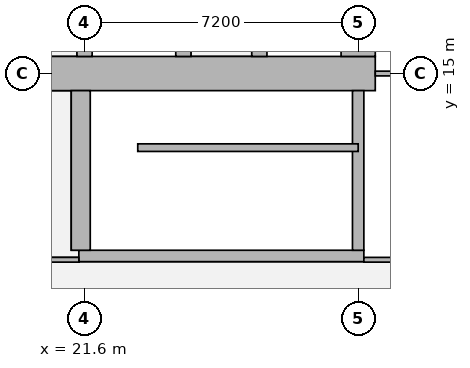
"""IFC4 building model, lengths in metres.
Left out: names, types, materials, properties, quantities, classifications, styles, units other than length and angle.
Written with IfcOpenShell. Run it as: python <this file> out.ifc"""

import sys

from ifc_helpers import new_model, si_unit, direction, frame, frame_2d, origin, place, context, subcontext, project, spatial, rectangle, extrude, element, fill, save


model = new_model("IFC4")
c1 = context("Model", 3, precision=1e-05, world=origin(), true_north=direction((0.0, 1.0)))
c2 = subcontext(c1, "Body", "Model", "MODEL_VIEW")
j1 = project(units=[si_unit("LENGTHUNIT", "METRE"), si_unit("PLANEANGLEUNIT", "RADIAN")], contexts=[c1])
p1 = place(None, origin())
s1 = spatial("IfcSite", under=j1, at=p1, CompositionType="ELEMENT")
p2 = place(p1, origin())
s2 = spatial("IfcBuilding", under=s1, at=p2, CompositionType="ELEMENT")
p3 = place(p2, frame((0.0, 0.0, 81.65)))
s3 = spatial("IfcBuildingStorey", under=s2, at=p3, CompositionType="ELEMENT", Elevation=81.65)
p4 = place(p3, frame((13.95, 15.0, 0.0), z_axis=(0.0, 0.0, 1.0), x_axis=(1.0, 0.0, 0.0)))
e1 = element("IfcWall", 1, at=p4, inside=s3, PredefinedType="SHEAR", context=c2, shape_type="SweptSolid", body=[
    extrude(rectangle(XDim=15.3, YDim=0.9, at=frame_2d((7.65, 0.0))), origin(), (0.0, 0.0, 1.0), 3.75),
])
p5 = place(p4, frame((4.45, 0.0, 0.0)))
e2 = element("IfcOpeningElement", 2, at=p5, cuts=e1, PredefinedType="OPENING", context=c2, shape_type="SweptSolid", body=[
    extrude(rectangle(XDim=1.8, YDim=2.1, at=frame_2d((0.9, 1.05))), frame((0.0, 0.46, 0.0), z_axis=(0.0, -1.0, 0.0), x_axis=(1.0, 0.0, 0.0)), (0.0, 0.0, 1.0), 0.92),
])
p6 = place(p4, frame((10.7, 0.0, 0.0)))
e3 = element("IfcOpeningElement", 3, at=p6, cuts=e1, PredefinedType="OPENING", context=c2, shape_type="SweptSolid", body=[
    extrude(rectangle(XDim=1.1, YDim=2.1, at=frame_2d((0.55, 1.05))), frame((0.0, 0.46, 0.0), z_axis=(0.0, -1.0, 0.0), x_axis=(1.0, 0.0, 0.0)), (0.0, 0.0, 1.0), 0.92),
])
p7 = place(p3, frame((28.8, 15.45, 0.0), z_axis=(0.0, 0.0, 1.0), x_axis=(0.0, 1.0, 0.0)))
e4 = element("IfcWall", 4, at=p7, inside=s3, PredefinedType="SHEAR", context=c2, shape_type="SweptSolid", body=[
    extrude(rectangle(XDim=14.1, YDim=0.9, at=frame_2d((7.05, 0.0))), origin(), (0.0, 0.0, 1.0), 3.75),
])
for number, where, z_axis, x_axis in (
    (5, (21.6, 15.45, 0.0), (0.0, 0.0, 1.0), (0.0, 1.0, 0.0)),
    (6, (24.2, 15.45, 0.0), (0.0, 0.0, 1.0), (0.0, 1.0, 0.0)),
):
    element("IfcWall", number, at=place(p3, frame(where, z_axis=z_axis, x_axis=x_axis)), inside=s3, PredefinedType="SHEAR", context=c2, shape_type="SweptSolid", body=[
        extrude(rectangle(XDim=14.1, YDim=0.4, at=frame_2d((7.05, 0.0))), origin(), (0.0, 0.0, 1.0), 3.75),
    ])
p8 = place(p3, frame((26.2, 15.45, 0.0), z_axis=(0.0, 0.0, 1.0), x_axis=(0.0, 1.0, 0.0)))
e7 = element("IfcWall", 7, at=p8, inside=s3, PredefinedType="SHEAR", context=c2, shape_type="SweptSolid", body=[
    extrude(rectangle(XDim=3.1, YDim=0.4, at=frame_2d((1.55, 0.0))), origin(), (0.0, 0.0, 1.0), 3.75),
])
p9 = place(p8, frame((0.825, 0.0, 0.0)))
e8 = element("IfcOpeningElement", 8, at=p9, cuts=e7, PredefinedType="OPENING", context=c2, shape_type="SweptSolid", body=[
    extrude(rectangle(XDim=1.2, YDim=2.1, at=frame_2d((0.6, 1.05))), frame((0.0, 0.21, 0.0), z_axis=(0.0, -1.0, 0.0), x_axis=(1.0, 0.0, 0.0)), (0.0, 0.0, 1.0), 0.42),
])
p10 = place(p3, frame((21.45, 10.2, 0.0), z_axis=(0.0, 0.0, 1.0), x_axis=(1.0, 0.0, 0.0)))
e9 = element("IfcWall", 9, at=p10, inside=s3, PredefinedType="SHEAR", context=c2, shape_type="SweptSolid", body=[
    extrude(rectangle(XDim=7.5, YDim=0.3, at=frame_2d((3.75, 0.0))), origin(), (0.0, 0.0, 1.0), 3.75),
])
p11 = place(p10, frame((0.5, 0.0, 0.0)))
e10 = element("IfcOpeningElement", 10, at=p11, cuts=e9, PredefinedType="OPENING", context=c2, shape_type="SweptSolid", body=[
    extrude(rectangle(XDim=1.1, YDim=2.1, at=frame_2d((0.55, 1.05))), frame((0.0, 0.16, 0.0), z_axis=(0.0, -1.0, 0.0), x_axis=(1.0, 0.0, 0.0)), (0.0, 0.0, 1.0), 0.32),
])
p12 = place(p3, frame((21.5, 10.35, 0.0), z_axis=(0.0, 0.0, 1.0), x_axis=(0.0, 1.0, 0.0)))
e11 = element("IfcWall", 11, at=p12, inside=s3, PredefinedType="SHEAR", context=c2, shape_type="SweptSolid", body=[
    extrude(rectangle(XDim=4.2, YDim=0.5, at=frame_2d((2.1, 0.0))), origin(), (0.0, 0.0, 1.0), 3.75),
])
p13 = place(p3, frame((28.8, 10.35, 0.0), z_axis=(0.0, 0.0, 1.0), x_axis=(0.0, 1.0, 0.0)))
e12 = element("IfcWall", 12, at=p13, inside=s3, PredefinedType="SHEAR", context=c2, shape_type="SweptSolid", body=[
    extrude(rectangle(XDim=4.2, YDim=0.3, at=frame_2d((2.1, 0.0))), origin(), (0.0, 0.0, 1.0), 3.75),
])
p14 = place(p3, frame((10.163, 10.1, 0.0), z_axis=(0.0, 0.0, 1.0), x_axis=(1.0, 0.0, 0.0)))
e13 = element("IfcWall", 13, at=p14, inside=s3, PredefinedType="PARTITIONING", context=c2, shape_type="SweptSolid", body=[
    extrude(rectangle(XDim=11.287, YDim=0.125, at=frame_2d((5.644, 0.0))), origin(), (0.0, 0.0, 1.0), 3.5),
])
p15 = place(p14, frame((7.832, 0.0, 0.0)))
e14 = element("IfcOpeningElement", 14, at=p15, cuts=e13, PredefinedType="OPENING", context=c2, shape_type="SweptSolid", body=[
    extrude(rectangle(XDim=1.8, YDim=2.1, at=frame_2d((0.9, 1.05))), frame((0.0, 0.073, 0.0), z_axis=(0.0, -1.0, 0.0), x_axis=(1.0, 0.0, 0.0)), (0.0, 0.0, 1.0), 0.145),
])
p16 = place(p3, frame((28.95, 10.1, 0.0), z_axis=(0.0, 0.0, 1.0), x_axis=(1.0, 0.0, 0.0)))
e15 = element("IfcWall", 15, at=p16, inside=s3, PredefinedType="PARTITIONING", context=c2, shape_type="SweptSolid", body=[
    extrude(rectangle(XDim=9.188, YDim=0.125, at=frame_2d((4.594, 0.0))), origin(), (0.0, 0.0, 1.0), 3.5),
])
p17 = place(p3, frame((29.25, 15.0, 0.0), z_axis=(0.0, 0.0, 1.0), x_axis=(1.0, 0.0, 0.0)))
e16 = element("IfcWall", 16, at=p17, inside=s3, PredefinedType="PARTITIONING", context=c2, shape_type="SweptSolid", body=[
    extrude(rectangle(XDim=5.949, YDim=0.125, at=frame_2d((2.975, 0.0))), origin(), (0.0, 0.0, 1.0), 3.5),
])
p18 = place(p3, frame((23.0, 13.05, 0.0), z_axis=(0.0, 0.0, 1.0), x_axis=(1.0, 0.0, 0.0)))
e17 = element("IfcWall", 17, at=p18, inside=s3, PredefinedType="SHEAR", context=c2, shape_type="SweptSolid", body=[
    extrude(rectangle(XDim=5.8, YDim=0.2, at=frame_2d((2.9, 0.0))), origin(), (0.0, 0.0, 1.0), 3.75),
])
p19 = place(p6, origin())
e18 = element("IfcDoor", 18, at=p19, inside=s3, OperationType="SINGLE_SWING_LEFT", PredefinedType="DOOR", context=c2, shape_type="SweptSolid", body=[
    extrude(rectangle(XDim=1.1, YDim=2.1, at=frame_2d((0.55, 1.05))), frame((0.0, 0.025, 0.0), z_axis=(0.0, -1.0, 0.0), x_axis=(1.0, 0.0, 0.0)), (0.0, 0.0, 1.0), 0.05),
])
fill(e3, e18)
p20 = place(p11, origin())
e19 = element("IfcDoor", 19, at=p20, inside=s3, OperationType="SINGLE_SWING_LEFT", PredefinedType="DOOR", context=c2, shape_type="SweptSolid", body=[
    extrude(rectangle(XDim=1.1, YDim=2.1, at=frame_2d((0.55, 1.05))), frame((0.0, 0.025, 0.0), z_axis=(0.0, -1.0, 0.0), x_axis=(1.0, 0.0, 0.0)), (0.0, 0.0, 1.0), 0.05),
])
fill(e10, e19)
save(model, sys.argv[1])
